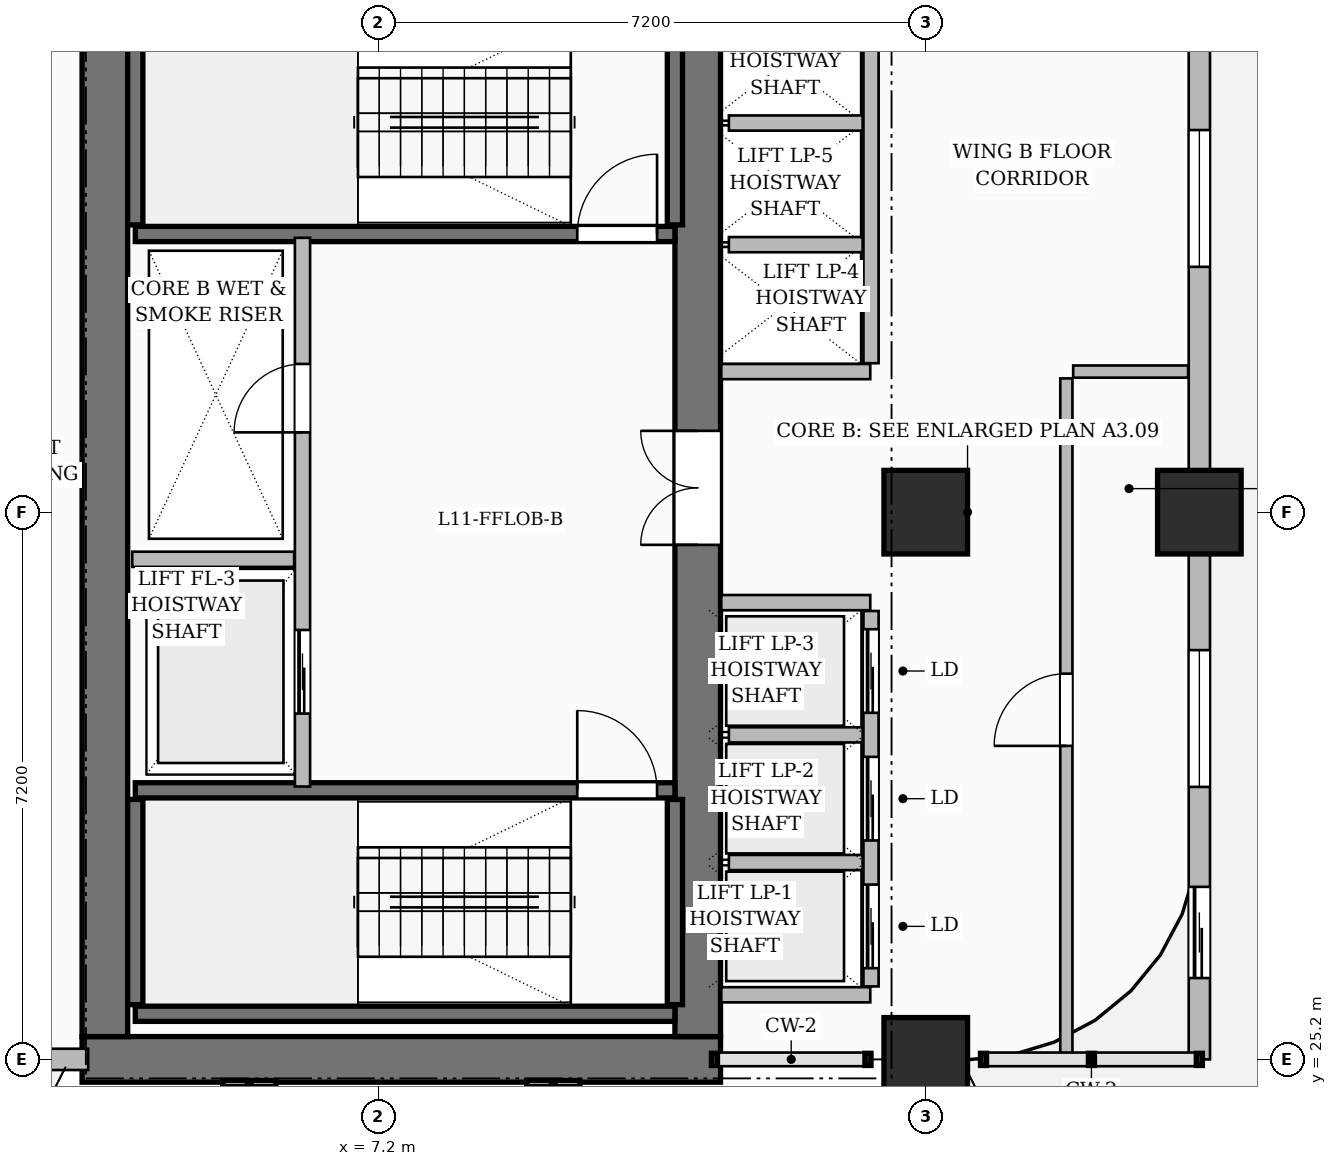
"""IFC4 building model, lengths in metres.
Left out: names, types, materials, properties, quantities, classifications, styles, units other than length and angle.
Written with IfcOpenShell. Run it as: python <this file> out.ifc"""

import sys

from ifc_helpers import new_model, si_unit, direction, frame, frame_2d, origin, origin_2d, place, context, subcontext, project, spatial, rectangle, extrude, source, transform, mapped, element, fill, save


model = new_model("IFC4")
c1 = context("Model", 3, precision=1e-05, world=origin(), true_north=direction((0.0, 1.0)))
c2 = subcontext(c1, "Body", "Model", "MODEL_VIEW")
j1 = project(units=[si_unit("LENGTHUNIT", "METRE"), si_unit("PLANEANGLEUNIT", "RADIAN")], contexts=[c1])
p1 = place(None, origin())
s1 = spatial("IfcSite", under=j1, at=p1, CompositionType="ELEMENT")
p2 = place(p1, origin())
s2 = spatial("IfcBuilding", under=s1, at=p2, CompositionType="ELEMENT")
p3 = place(p2, frame((0.0, 0.0, 50.9)))
s3 = spatial("IfcBuildingStorey", under=s2, at=p3, CompositionType="ELEMENT", Elevation=50.9)
p4 = place(p3, frame((3.3, 25.2, 0.0), z_axis=(0.0, 0.0, 1.0), x_axis=(1.0, 0.0, 0.0)))
e1 = element("IfcWall", 1, at=p4, inside=s3, PredefinedType="SHEAR", context=c2, shape_type="SweptSolid", body=[
    extrude(rectangle(XDim=8.4, YDim=0.6, at=frame_2d((4.2, 0.0))), origin(), (0.0, 0.0, 1.0), 3.7),
])
p5 = place(p3, frame((3.6, 25.5, 0.0), z_axis=(0.0, 0.0, 1.0), x_axis=(0.0, 1.0, 0.0)))
e2 = element("IfcWall", 2, at=p5, inside=s3, PredefinedType="SHEAR", context=c2, shape_type="SweptSolid", body=[
    extrude(rectangle(XDim=13.8, YDim=0.6, at=frame_2d((6.9, 0.0))), origin(), (0.0, 0.0, 1.0), 3.7),
])
p6 = place(p3, frame((11.4, 25.5, 0.0), z_axis=(0.0, 0.0, 1.0), x_axis=(0.0, 1.0, 0.0)))
e3 = element("IfcWall", 3, at=p6, inside=s3, PredefinedType="SHEAR", context=c2, shape_type="SweptSolid", body=[
    extrude(rectangle(XDim=13.8, YDim=0.6, at=frame_2d((6.9, 0.0))), origin(), (0.0, 0.0, 1.0), 3.7),
])
p7 = place(p6, frame((6.47, 0.0, 0.0)))
e4 = element("IfcOpeningElement", 4, at=p7, cuts=e3, PredefinedType="OPENING", context=c2, shape_type="SweptSolid", body=[
    extrude(rectangle(XDim=1.5, YDim=2.2, at=frame_2d((0.75, 1.1))), frame((0.0, 0.31, 0.0), z_axis=(0.0, -1.0, 0.0), x_axis=(1.0, 0.0, 0.0)), (0.0, 0.0, 1.0), 0.62),
])
m1 = source(origin(), c2, "Body", "SweptSolid", [
    extrude(rectangle(XDim=1.1, YDim=1.1, at=origin_2d()), origin(), (0.0, 0.0, 1.0), 3.7),
])
for number, where, z_axis, x_axis in (
    (5, (14.4, 25.2, 0.0), (0.0, 0.0, 1.0), (1.0, 0.0, 0.0)),
    (6, (14.4, 32.4, 0.0), (0.0, 0.0, 1.0), (1.0, 0.0, 0.0)),
    (7, (18.0, 32.4, 0.0), (0.0, 0.0, 1.0), (1.0, 0.0, 0.0)),
):
    element("IfcColumn", number, at=place(p3, frame(where, z_axis=z_axis, x_axis=x_axis)), inside=s3, PredefinedType="COLUMN", context=c2, shape_type="MappedRepresentation", body=[
        mapped(m1, transform((0.0, 0.0, 0.0), scale=1.0)),
    ])
p8 = place(p3, frame((4.0, 25.8, 0.0), z_axis=(0.0, 0.0, 1.0), x_axis=(1.0, 0.0, 0.0)))
e8 = element("IfcWall", 8, at=p8, inside=s3, PredefinedType="SHEAR", context=c2, shape_type="SweptSolid", body=[
    extrude(rectangle(XDim=7.1, YDim=0.2, at=frame_2d((3.55, 0.0))), origin(), (0.0, 0.0, 1.0), 3.7),
])
for number, where, z_axis, x_axis in (
    (9, (4.0, 25.92, 0.0), (0.0, 0.0, 1.0), (0.0, 1.0, 0.0)),
    (10, (11.1, 25.92, 0.0), (0.0, 0.0, 1.0), (0.0, 1.0, 0.0)),
):
    element("IfcWall", number, at=place(p3, frame(where, z_axis=z_axis, x_axis=x_axis)), inside=s3, PredefinedType="SHEAR", context=c2, shape_type="SweptSolid", body=[
        extrude(rectangle(XDim=2.7, YDim=0.2, at=frame_2d((1.35, 0.0))), origin(), (0.0, 0.0, 1.0), 3.7),
    ])
p9 = place(p3, frame((4.0, 28.74, 0.0), z_axis=(0.0, 0.0, 1.0), x_axis=(1.0, 0.0, 0.0)))
e11 = element("IfcWall", 11, at=p9, inside=s3, PredefinedType="SHEAR", context=c2, shape_type="SweptSolid", body=[
    extrude(rectangle(XDim=7.1, YDim=0.2, at=frame_2d((3.55, 0.0))), origin(), (0.0, 0.0, 1.0), 3.7),
])
p10 = place(p9, frame((5.815, 0.0, 0.0)))
e12 = element("IfcOpeningElement", 12, at=p10, cuts=e11, PredefinedType="OPENING", context=c2, shape_type="SweptSolid", body=[
    extrude(rectangle(XDim=1.05, YDim=2.2, at=frame_2d((0.525, 1.1))), frame((0.0, 0.11, 0.0), z_axis=(0.0, -1.0, 0.0), x_axis=(1.0, 0.0, 0.0)), (0.0, 0.0, 1.0), 0.22),
])
for number, where, z_axis, x_axis in (
    (13, (4.0, 36.18, 0.0), (0.0, 0.0, 1.0), (0.0, 1.0, 0.0)),
    (14, (11.1, 36.18, 0.0), (0.0, 0.0, 1.0), (0.0, 1.0, 0.0)),
):
    element("IfcWall", number, at=place(p3, frame(where, z_axis=z_axis, x_axis=x_axis)), inside=s3, PredefinedType="SHEAR", context=c2, shape_type="SweptSolid", body=[
        extrude(rectangle(XDim=2.7, YDim=0.2, at=frame_2d((1.35, 0.0))), origin(), (0.0, 0.0, 1.0), 3.7),
    ])
p11 = place(p3, frame((4.0, 36.06, 0.0), z_axis=(0.0, 0.0, 1.0), x_axis=(1.0, 0.0, 0.0)))
e15 = element("IfcWall", 15, at=p11, inside=s3, PredefinedType="SHEAR", context=c2, shape_type="SweptSolid", body=[
    extrude(rectangle(XDim=7.1, YDim=0.2, at=frame_2d((3.55, 0.0))), origin(), (0.0, 0.0, 1.0), 3.7),
])
p12 = place(p11, frame((5.815, 0.0, 0.0)))
e16 = element("IfcOpeningElement", 16, at=p12, cuts=e15, PredefinedType="OPENING", context=c2, shape_type="SweptSolid", body=[
    extrude(rectangle(XDim=1.05, YDim=2.2, at=frame_2d((0.525, 1.1))), frame((0.0, 0.11, 0.0), z_axis=(0.0, -1.0, 0.0), x_axis=(1.0, 0.0, 0.0)), (0.0, 0.0, 1.0), 0.22),
])
p13 = place(p3, frame((6.2, 28.79, 0.0), z_axis=(0.0, 0.0, 1.0), x_axis=(0.0, 1.0, 0.0)))
e17 = element("IfcWall", 17, at=p13, inside=s3, PredefinedType="PARTITIONING", context=c2, shape_type="SweptSolid", body=[
    extrude(rectangle(XDim=7.22, YDim=0.2, at=frame_2d((3.61, 0.0))), origin(), (0.0, 0.0, 1.0), 3.45),
])
p14 = place(p13, frame((4.66, 0.0, 0.0)))
e18 = element("IfcOpeningElement", 18, at=p14, cuts=e17, PredefinedType="OPENING", context=c2, shape_type="SweptSolid", body=[
    extrude(rectangle(XDim=0.9, YDim=2.1, at=frame_2d((0.45, 1.05))), frame((0.0, 0.11, 0.0), z_axis=(0.0, -1.0, 0.0), x_axis=(1.0, 0.0, 0.0)), (0.0, 0.0, 1.0), 0.22),
])
p15 = place(p13, frame((0.96, 0.0, 0.0)))
e19 = element("IfcOpeningElement", 19, at=p15, cuts=e17, PredefinedType="OPENING", context=c2, shape_type="SweptSolid", body=[
    extrude(rectangle(XDim=1.1, YDim=2.2, at=frame_2d((0.55, 1.1))), frame((0.0, 0.11, 0.0), z_axis=(0.0, -1.0, 0.0), x_axis=(1.0, 0.0, 0.0)), (0.0, 0.0, 1.0), 0.22),
])
p16 = place(p3, frame((3.96, 31.78, 0.0), z_axis=(0.0, 0.0, 1.0), x_axis=(1.0, 0.0, 0.0)))
e20 = element("IfcWall", 20, at=p16, inside=s3, PredefinedType="PARTITIONING", context=c2, shape_type="SweptSolid", body=[
    extrude(rectangle(XDim=2.13, YDim=0.2, at=frame_2d((1.065, 0.0))), origin(), (0.0, 0.0, 1.0), 3.45),
])
for number, where, z_axis, x_axis in (
    (21, (11.71, 26.05, 0.0), (0.0, 0.0, 1.0), (1.0, 0.0, 0.0)),
    (22, (11.71, 31.21, 0.0), (0.0, 0.0, 1.0), (1.0, 0.0, 0.0)),
):
    element("IfcWall", number, at=place(p3, frame(where, z_axis=z_axis, x_axis=x_axis)), inside=s3, PredefinedType="PARTITIONING", context=c2, shape_type="SweptSolid", body=[
        extrude(rectangle(XDim=1.96, YDim=0.2, at=frame_2d((0.98, 0.0))), origin(), (0.0, 0.0, 1.0), 3.45),
    ])
p17 = place(p3, frame((13.68, 26.16, 0.0), z_axis=(0.0, 0.0, 1.0), x_axis=(0.0, 1.0, 0.0)))
e23 = element("IfcWall", 23, at=p17, inside=s3, PredefinedType="PARTITIONING", context=c2, shape_type="SweptSolid", body=[
    extrude(rectangle(XDim=4.94, YDim=0.2, at=frame_2d((2.47, 0.0))), origin(), (0.0, 0.0, 1.0), 3.45),
])
p18 = place(p17, frame((0.24, 0.0, 0.0)))
e24 = element("IfcOpeningElement", 24, at=p18, cuts=e23, PredefinedType="OPENING", context=c2, shape_type="SweptSolid", body=[
    extrude(rectangle(XDim=1.1, YDim=2.2, at=frame_2d((0.55, 1.1))), frame((0.0, 0.11, 0.0), z_axis=(0.0, -1.0, 0.0), x_axis=(1.0, 0.0, 0.0)), (0.0, 0.0, 1.0), 0.22),
])
p19 = place(p17, frame((1.92, 0.0, 0.0)))
e25 = element("IfcOpeningElement", 25, at=p19, cuts=e23, PredefinedType="OPENING", context=c2, shape_type="SweptSolid", body=[
    extrude(rectangle(XDim=1.1, YDim=2.2, at=frame_2d((0.55, 1.1))), frame((0.0, 0.11, 0.0), z_axis=(0.0, -1.0, 0.0), x_axis=(1.0, 0.0, 0.0)), (0.0, 0.0, 1.0), 0.22),
])
p20 = place(p17, frame((3.6, 0.0, 0.0)))
e26 = element("IfcOpeningElement", 26, at=p20, cuts=e23, PredefinedType="OPENING", context=c2, shape_type="SweptSolid", body=[
    extrude(rectangle(XDim=1.1, YDim=2.2, at=frame_2d((0.55, 1.1))), frame((0.0, 0.11, 0.0), z_axis=(0.0, -1.0, 0.0), x_axis=(1.0, 0.0, 0.0)), (0.0, 0.0, 1.0), 0.22),
])
for number, where, z_axis, x_axis in (
    (27, (11.81, 27.79, 0.0), (0.0, 0.0, 1.0), (1.0, 0.0, 0.0)),
    (28, (11.81, 29.47, 0.0), (0.0, 0.0, 1.0), (1.0, 0.0, 0.0)),
):
    element("IfcWall", number, at=place(p3, frame(where, z_axis=z_axis, x_axis=x_axis)), inside=s3, PredefinedType="PARTITIONING", context=c2, shape_type="SweptSolid", body=[
        extrude(rectangle(XDim=1.76, YDim=0.2, at=frame_2d((0.88, 0.0))), origin(), (0.0, 0.0, 1.0), 3.45),
    ])
p21 = place(p3, frame((11.71, 34.25, 0.0), z_axis=(0.0, 0.0, 1.0), x_axis=(1.0, 0.0, 0.0)))
e29 = element("IfcWall", 29, at=p21, inside=s3, PredefinedType="PARTITIONING", context=c2, shape_type="SweptSolid", body=[
    extrude(rectangle(XDim=1.96, YDim=0.2, at=frame_2d((0.98, 0.0))), origin(), (0.0, 0.0, 1.0), 3.45),
])
p22 = place(p3, frame((13.68, 34.36, 0.0), z_axis=(0.0, 0.0, 1.0), x_axis=(0.0, 1.0, 0.0)))
e30 = element("IfcWall", 30, at=p22, inside=s3, PredefinedType="PARTITIONING", context=c2, shape_type="SweptSolid", body=[
    extrude(rectangle(XDim=4.72, YDim=0.2, at=frame_2d((2.36, 0.0))), origin(), (0.0, 0.0, 1.0), 3.45),
])
for number, where, z_axis, x_axis in (
    (31, (11.81, 35.92, 0.0), (0.0, 0.0, 1.0), (1.0, 0.0, 0.0)),
    (32, (11.81, 37.52, 0.0), (0.0, 0.0, 1.0), (1.0, 0.0, 0.0)),
):
    element("IfcWall", number, at=place(p3, frame(where, z_axis=z_axis, x_axis=x_axis)), inside=s3, PredefinedType="PARTITIONING", context=c2, shape_type="SweptSolid", body=[
        extrude(rectangle(XDim=1.76, YDim=0.2, at=frame_2d((0.88, 0.0))), origin(), (0.0, 0.0, 1.0), 3.45),
    ])
p23 = place(p3, frame((16.25, 25.228, 0.0), z_axis=(0.0, 0.0, 1.0), x_axis=(0.0, 1.0, 0.0)))
e33 = element("IfcWall", 33, at=p23, inside=s3, PredefinedType="PARTITIONING", context=c2, shape_type="SweptSolid", body=[
    extrude(rectangle(XDim=8.932, YDim=0.16, at=frame_2d((4.466, 0.0))), origin(), (0.0, 0.0, 1.0), 3.45),
])
p24 = place(p23, frame((4.097, 0.0, 0.0)))
e34 = element("IfcOpeningElement", 34, at=p24, cuts=e33, PredefinedType="OPENING", context=c2, shape_type="SweptSolid", body=[
    extrude(rectangle(XDim=0.95, YDim=2.15, at=frame_2d((0.475, 1.075))), frame((0.0, 0.09, 0.0), z_axis=(0.0, -1.0, 0.0), x_axis=(1.0, 0.0, 0.0)), (0.0, 0.0, 1.0), 0.18),
])
p25 = place(p3, frame((16.34, 34.25, 0.0), z_axis=(0.0, 0.0, 1.0), x_axis=(1.0, 0.0, 0.0)))
e35 = element("IfcWall", 35, at=p25, inside=s3, PredefinedType="PARTITIONING", context=c2, shape_type="SweptSolid", body=[
    extrude(rectangle(XDim=1.512, YDim=0.16, at=frame_2d((0.756, 0.0))), origin(), (0.0, 0.0, 1.0), 3.45),
])
p26 = place(p3, frame((0.0, 25.2, 0.0), z_axis=(0.0, 0.0, 1.0), x_axis=(1.0, 0.0, 0.0)))
e36 = element("IfcWall", 36, at=p26, inside=s3, PredefinedType="SOLIDWALL", context=c2, shape_type="SweptSolid", body=[
    extrude(rectangle(XDim=3.38, YDim=0.28, at=frame_2d((1.69, 0.0))), origin(), (0.0, 0.0, 1.0), 3.45),
])
p27 = place(p26, frame((1.5, 0.0, 0.0)))
e37 = element("IfcOpeningElement", 37, at=p27, cuts=e36, PredefinedType="OPENING", context=c2, shape_type="SweptSolid", body=[
    extrude(rectangle(XDim=1.2, YDim=2.2, at=frame_2d((0.6, 1.1))), frame((0.0, 0.15, 0.0), z_axis=(0.0, -1.0, 0.0), x_axis=(1.0, 0.0, 0.0)), (0.0, 0.0, 1.0), 0.3),
])
p28 = place(p3, frame((18.0, 25.2, 0.0), z_axis=(0.0, 0.0, 1.0), x_axis=(0.0, 1.0, 0.0)))
e38 = element("IfcWall", 38, at=p28, inside=s3, PredefinedType="SOLIDWALL", context=c2, shape_type="SweptSolid", body=[
    extrude(rectangle(XDim=21.55, YDim=0.28, at=frame_2d((10.775, 0.0))), origin(), (0.0, 0.0, 1.0), 3.45),
])
p29 = place(p28, frame((18.5, 0.0, 0.0)))
e39 = element("IfcOpeningElement", 39, at=p29, cuts=e38, PredefinedType="OPENING", context=c2, shape_type="SweptSolid", body=[
    extrude(rectangle(XDim=1.2, YDim=2.2, at=frame_2d((0.6, 1.1))), frame((0.0, 0.15, 0.0), z_axis=(0.0, -1.0, 0.0), x_axis=(1.0, 0.0, 0.0)), (0.0, 0.0, 1.0), 0.3),
])
p30 = place(p28, frame((1.07, 0.0, 0.0)))
e40 = element("IfcOpeningElement", 40, at=p30, cuts=e38, PredefinedType="OPENING", context=c2, shape_type="SweptSolid", body=[
    extrude(rectangle(XDim=1.2, YDim=2.2, at=frame_2d((0.6, 1.1))), frame((0.0, 0.15, 0.0), z_axis=(0.0, -1.0, 0.0), x_axis=(1.0, 0.0, 0.0)), (0.0, 0.0, 1.0), 0.3),
])
p31 = place(p28, frame((3.585, 0.0, 0.8)))
e41 = element("IfcOpeningElement", 41, at=p31, cuts=e38, PredefinedType="OPENING", context=c2, shape_type="SweptSolid", body=[
    extrude(rectangle(XDim=1.8, YDim=1.85, at=frame_2d((0.9, 0.925))), frame((0.0, 0.15, 0.0), z_axis=(0.0, -1.0, 0.0), x_axis=(1.0, 0.0, 0.0)), (0.0, 0.0, 1.0), 0.3),
])
p32 = place(p28, frame((10.428, 0.0, 0.8)))
e42 = element("IfcOpeningElement", 42, at=p32, cuts=e38, PredefinedType="OPENING", context=c2, shape_type="SweptSolid", body=[
    extrude(rectangle(XDim=1.8, YDim=1.85, at=frame_2d((0.9, 0.925))), frame((0.0, 0.15, 0.0), z_axis=(0.0, -1.0, 0.0), x_axis=(1.0, 0.0, 0.0)), (0.0, 0.0, 1.0), 0.3),
])
p33 = place(p28, frame((15.8, 0.0, 0.8)))
e43 = element("IfcOpeningElement", 43, at=p33, cuts=e38, PredefinedType="OPENING", context=c2, shape_type="SweptSolid", body=[
    extrude(rectangle(XDim=1.8, YDim=1.85, at=frame_2d((0.9, 0.925))), frame((0.0, 0.15, 0.0), z_axis=(0.0, -1.0, 0.0), x_axis=(1.0, 0.0, 0.0)), (0.0, 0.0, 1.0), 0.3),
])
m2 = source(origin(), c2, "Body", "SweptSolid", [
    extrude(rectangle(XDim=1.05, YDim=2.2, at=frame_2d((0.525, 1.1))), frame((0.0, 0.025, 0.0), z_axis=(0.0, -1.0, 0.0), x_axis=(1.0, 0.0, 0.0)), (0.0, 0.0, 1.0), 0.05),
])
p34 = place(p10, origin())
e44 = element("IfcDoor", 44, at=p34, inside=s3, OperationType="SINGLE_SWING_LEFT", PredefinedType="DOOR", context=c2, shape_type="MappedRepresentation", body=[
    mapped(m2, transform((0.0, 0.0, 0.0), scale=1.0)),
])
fill(e12, e44)
p35 = place(p12, origin())
e45 = element("IfcDoor", 45, at=p35, inside=s3, OperationType="SINGLE_SWING_RIGHT", PredefinedType="DOOR", context=c2, shape_type="MappedRepresentation", body=[
    mapped(m2, transform((0.0, 0.0, 0.0), scale=1.0)),
])
fill(e16, e45)
m3 = source(origin(), c2, "Body", "SweptSolid", [
    extrude(rectangle(XDim=0.9, YDim=2.1, at=frame_2d((0.45, 1.05))), frame((0.0, 0.025, 0.0), z_axis=(0.0, -1.0, 0.0), x_axis=(1.0, 0.0, 0.0)), (0.0, 0.0, 1.0), 0.05),
])
p36 = place(p14, origin())
e46 = element("IfcDoor", 46, at=p36, inside=s3, OperationType="SINGLE_SWING_LEFT", PredefinedType="DOOR", context=c2, shape_type="MappedRepresentation", body=[
    mapped(m3, transform((0.0, 0.0, 0.0), scale=1.0)),
])
fill(e18, e46)
m4 = source(origin(), c2, "Body", "SweptSolid", [
    extrude(rectangle(XDim=1.5, YDim=2.2, at=frame_2d((0.75, 1.1))), frame((0.0, 0.025, 0.0), z_axis=(0.0, -1.0, 0.0), x_axis=(1.0, 0.0, 0.0)), (0.0, 0.0, 1.0), 0.05),
])
p37 = place(p7, origin())
e47 = element("IfcDoor", 47, at=p37, inside=s3, OperationType="DOUBLE_DOOR_SINGLE_SWING", PredefinedType="DOOR", context=c2, shape_type="MappedRepresentation", body=[
    mapped(m4, transform((0.0, 0.0, 0.0), scale=1.0)),
])
fill(e4, e47)
m5 = source(origin(), c2, "Body", "SweptSolid", [
    extrude(rectangle(XDim=0.95, YDim=2.15, at=frame_2d((0.475, 1.075))), frame((0.0, 0.025, 0.0), z_axis=(0.0, -1.0, 0.0), x_axis=(1.0, 0.0, 0.0)), (0.0, 0.0, 1.0), 0.05),
])
p38 = place(p24, origin())
e48 = element("IfcDoor", 48, at=p38, inside=s3, OperationType="SINGLE_SWING_LEFT", PredefinedType="DOOR", context=c2, shape_type="MappedRepresentation", body=[
    mapped(m5, transform((0.0, 0.0, 0.0), scale=1.0)),
])
fill(e34, e48)
m6 = source(origin(), c2, "Body", "SweptSolid", [
    extrude(rectangle(XDim=1.1, YDim=2.2, at=frame_2d((0.55, 1.1))), frame((0.0, 0.025, 0.0), z_axis=(0.0, -1.0, 0.0), x_axis=(1.0, 0.0, 0.0)), (0.0, 0.0, 1.0), 0.05),
])
p39 = place(p15, origin())
e49 = element("IfcDoor", 49, at=p39, inside=s3, OperationType="SLIDING_TO_LEFT", PredefinedType="DOOR", context=c2, shape_type="MappedRepresentation", body=[
    mapped(m6, transform((0.0, 0.0, 0.0), scale=1.0)),
])
fill(e19, e49)
p40 = place(p18, origin())
e50 = element("IfcDoor", 50, at=p40, inside=s3, OperationType="SLIDING_TO_LEFT", PredefinedType="DOOR", context=c2, shape_type="MappedRepresentation", body=[
    mapped(m6, transform((0.0, 0.0, 0.0), scale=1.0)),
])
fill(e24, e50)
p41 = place(p19, origin())
e51 = element("IfcDoor", 51, at=p41, inside=s3, OperationType="SLIDING_TO_LEFT", PredefinedType="DOOR", context=c2, shape_type="MappedRepresentation", body=[
    mapped(m6, transform((0.0, 0.0, 0.0), scale=1.0)),
])
fill(e25, e51)
p42 = place(p20, origin())
e52 = element("IfcDoor", 52, at=p42, inside=s3, OperationType="SLIDING_TO_LEFT", PredefinedType="DOOR", context=c2, shape_type="MappedRepresentation", body=[
    mapped(m6, transform((0.0, 0.0, 0.0), scale=1.0)),
])
fill(e26, e52)
m7 = source(origin(), c2, "Body", "SweptSolid", [
    extrude(rectangle(XDim=1.2, YDim=2.2, at=frame_2d((0.6, 1.1))), frame((0.0, 0.025, 0.0), z_axis=(0.0, -1.0, 0.0), x_axis=(1.0, 0.0, 0.0)), (0.0, 0.0, 1.0), 0.05),
])
p43 = place(p30, origin())
e53 = element("IfcDoor", 53, at=p43, inside=s3, OperationType="SLIDING_TO_LEFT", PredefinedType="DOOR", context=c2, shape_type="MappedRepresentation", body=[
    mapped(m7, transform((0.0, 0.0, 0.0), scale=1.0)),
])
fill(e40, e53)
m8 = source(origin(), c2, "Body", "SweptSolid", [
    extrude(rectangle(XDim=1.8, YDim=1.85, at=frame_2d((0.9, 0.925))), frame((0.0, 0.03, 0.0), z_axis=(0.0, -1.0, 0.0), x_axis=(1.0, 0.0, 0.0)), (0.0, 0.0, 1.0), 0.06),
])
p44 = place(p31, origin())
e54 = element("IfcWindow", 54, at=p44, inside=s3, PartitioningType="DOUBLE_PANEL_VERTICAL", PredefinedType="WINDOW", context=c2, shape_type="MappedRepresentation", body=[
    mapped(m8, transform((0.0, 0.0, 0.0), scale=1.0)),
])
fill(e41, e54)
p45 = place(p32, origin())
e55 = element("IfcWindow", 55, at=p45, inside=s3, PartitioningType="DOUBLE_PANEL_VERTICAL", PredefinedType="WINDOW", context=c2, shape_type="MappedRepresentation", body=[
    mapped(m8, transform((0.0, 0.0, 0.0), scale=1.0)),
])
fill(e42, e55)
save(model, sys.argv[1])
